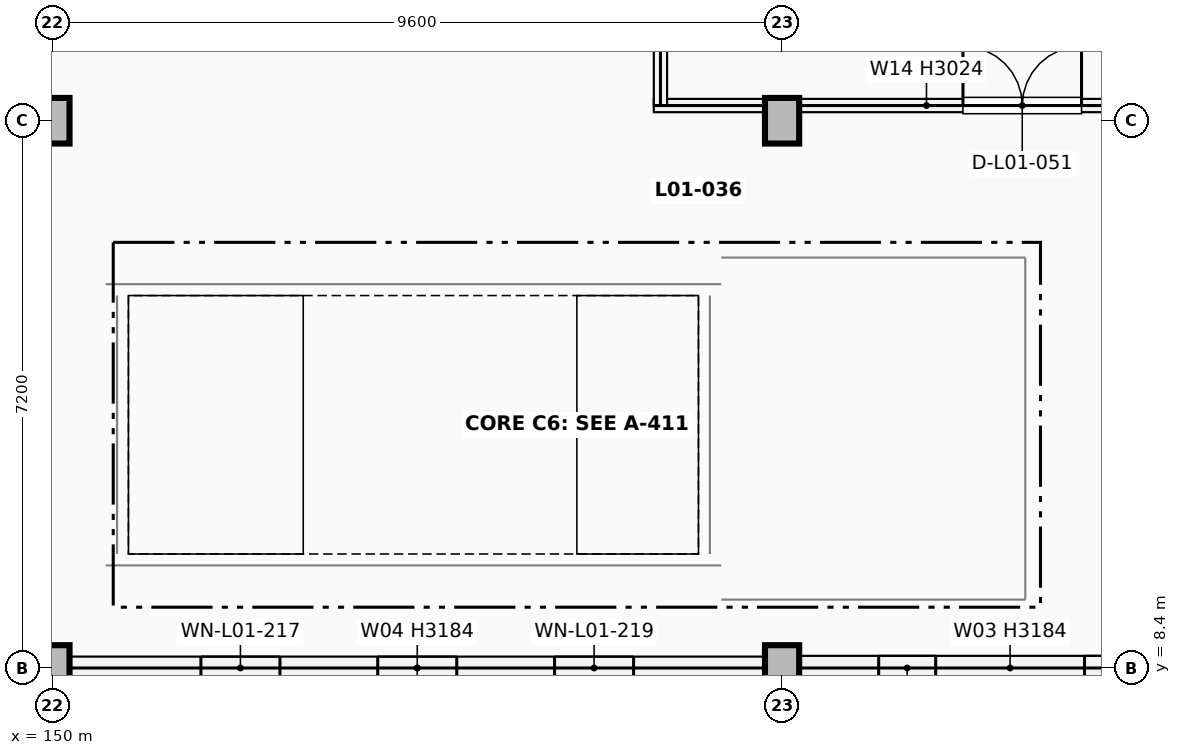
"""IFC4 building model, lengths in metres.
Left out: names, types, materials, properties, quantities, classifications, styles, units other than length and angle.
Written with IfcOpenShell. Run it as: python <this file> out.ifc"""

import sys

from ifc_helpers import new_model, si_unit, direction, frame, frame_2d, origin, origin_2d, place, context, subcontext, project, spatial, rectangle, extrude, element, fill, save


model = new_model("IFC4")
c1 = context("Model", 3, precision=1e-05, world=origin(), true_north=direction((0.0, 1.0)))
c2 = subcontext(c1, "Body", "Model", "MODEL_VIEW")
j1 = project(units=[si_unit("LENGTHUNIT", "METRE"), si_unit("PLANEANGLEUNIT", "RADIAN")], contexts=[c1])
p1 = place(None, origin())
s1 = spatial("IfcSite", under=j1, at=p1, CompositionType="ELEMENT")
p2 = place(p1, origin())
s2 = spatial("IfcBuilding", under=s1, at=p2, CompositionType="ELEMENT")
p3 = place(p2, frame((0.0, 0.0, 5.1)))
s3 = spatial("IfcBuildingStorey", under=s2, at=p3, CompositionType="ELEMENT", Elevation=5.1)
for number, where, z_axis, x_axis in (
    (1, (150.0, 8.4, 0.0), (0.0, 0.0, 1.0), (1.0, 0.0, 0.0)),
    (2, (150.0, 15.6, 0.0), (0.0, 0.0, 1.0), (1.0, 0.0, 0.0)),
    (3, (159.6, 8.4, 0.0), (0.0, 0.0, 1.0), (1.0, 0.0, 0.0)),
    (4, (159.6, 15.6, 0.0), (0.0, 0.0, 1.0), (1.0, 0.0, 0.0)),
):
    element("IfcColumn", number, at=place(p3, frame(where, z_axis=z_axis, x_axis=x_axis)), inside=s3, PredefinedType="COLUMN", context=c2, shape_type="SweptSolid", body=[
        extrude(rectangle(XDim=0.45, YDim=0.6, at=origin_2d()), origin(), (0.0, 0.0, 1.0), 4.42),
    ])
p4 = place(p3, frame((150.227, 8.4, 0.0), z_axis=(0.0, 0.0, 1.0), x_axis=(1.0, 0.0, 0.0)))
e5 = element("IfcWall", 5, at=p4, inside=s3, PredefinedType="SOLIDWALL", context=c2, shape_type="SweptSolid", body=[
    extrude(rectangle(XDim=9.146, YDim=0.3, at=frame_2d((4.573, 0.0))), origin(), (0.0, 0.0, 1.0), 3.184),
])
p5 = place(p4, frame((1.727, 0.0, 0.75)))
e6 = element("IfcOpeningElement", 6, at=p5, cuts=e5, PredefinedType="OPENING", context=c2, shape_type="SweptSolid", body=[
    extrude(rectangle(XDim=1.04, YDim=2.18, at=frame_2d((0.52, 1.09))), frame((0.0, 0.16, 0.0), z_axis=(0.0, -1.0, 0.0), x_axis=(1.0, 0.0, 0.0)), (0.0, 0.0, 1.0), 0.32),
])
p6 = place(p4, frame((4.053, 0.0, 0.75)))
e7 = element("IfcOpeningElement", 7, at=p6, cuts=e5, PredefinedType="OPENING", context=c2, shape_type="SweptSolid", body=[
    extrude(rectangle(XDim=1.04, YDim=2.18, at=frame_2d((0.52, 1.09))), frame((0.0, 0.16, 0.0), z_axis=(0.0, -1.0, 0.0), x_axis=(1.0, 0.0, 0.0)), (0.0, 0.0, 1.0), 0.32),
])
p7 = place(p4, frame((6.379, 0.0, 0.75)))
e8 = element("IfcOpeningElement", 8, at=p7, cuts=e5, PredefinedType="OPENING", context=c2, shape_type="SweptSolid", body=[
    extrude(rectangle(XDim=1.04, YDim=2.18, at=frame_2d((0.52, 1.09))), frame((0.0, 0.16, 0.0), z_axis=(0.0, -1.0, 0.0), x_axis=(1.0, 0.0, 0.0)), (0.0, 0.0, 1.0), 0.32),
])
p8 = place(p3, frame((159.827, 8.4, 0.0), z_axis=(0.0, 0.0, 1.0), x_axis=(1.0, 0.0, 0.0)))
e9 = element("IfcWall", 9, at=p8, inside=s3, PredefinedType="SOLIDWALL", context=c2, shape_type="SweptSolid", body=[
    extrude(rectangle(XDim=5.546, YDim=0.32, at=frame_2d((2.773, 0.0))), origin(), (0.0, 0.0, 1.0), 3.184),
])
p9 = place(p8, frame((1.044, 0.0, 0.75)))
e10 = element("IfcOpeningElement", 10, at=p9, cuts=e9, PredefinedType="OPENING", context=c2, shape_type="SweptSolid", body=[
    extrude(rectangle(XDim=0.75, YDim=2.3, at=frame_2d((0.375, 1.15))), frame((0.0, 0.17, 0.0), z_axis=(0.0, -1.0, 0.0), x_axis=(1.0, 0.0, 0.0)), (0.0, 0.0, 1.0), 0.34),
])
p10 = place(p8, frame((3.752, 0.0, 0.75)))
e11 = element("IfcOpeningElement", 11, at=p10, cuts=e9, PredefinedType="OPENING", context=c2, shape_type="SweptSolid", body=[
    extrude(rectangle(XDim=0.75, YDim=2.3, at=frame_2d((0.375, 1.15))), frame((0.0, 0.17, 0.0), z_axis=(0.0, -1.0, 0.0), x_axis=(1.0, 0.0, 0.0)), (0.0, 0.0, 1.0), 0.34),
])
p11 = place(p3, frame((150.85, 9.9, 0.0), z_axis=(0.0, 0.0, 1.0), x_axis=(0.0, 1.0, 0.0)))
e12 = element("IfcWall", 12, at=p11, inside=s3, PredefinedType="SHEAR", context=c2, shape_type="SweptSolid", body=[
    extrude(rectangle(XDim=3.4, YDim=0.3, at=frame_2d((1.7, 0.0))), origin(), (0.0, 0.0, 1.0), 4.42),
])
for number, where, z_axis, x_axis in (
    (13, (150.7, 9.75, 0.0), (0.0, 0.0, 1.0), (1.0, 0.0, 0.0)),
    (14, (150.7, 13.45, 0.0), (0.0, 0.0, 1.0), (1.0, 0.0, 0.0)),
):
    element("IfcWall", number, at=place(p3, frame(where, z_axis=z_axis, x_axis=x_axis)), inside=s3, PredefinedType="SHEAR", context=c2, shape_type="SweptSolid", body=[
        extrude(rectangle(XDim=8.1, YDim=0.3, at=frame_2d((4.05, 0.0))), origin(), (0.0, 0.0, 1.0), 4.42),
    ])
p12 = place(p3, frame((158.65, 9.9, 0.0), z_axis=(0.0, 0.0, 1.0), x_axis=(0.0, 1.0, 0.0)))
e15 = element("IfcWall", 15, at=p12, inside=s3, PredefinedType="SHEAR", context=c2, shape_type="SweptSolid", body=[
    extrude(rectangle(XDim=3.4, YDim=0.3, at=frame_2d((1.7, 0.0))), origin(), (0.0, 0.0, 1.0), 4.42),
])
p13 = place(p12, frame((1.1, 0.0, 0.0)))
e16 = element("IfcOpeningElement", 16, at=p13, cuts=e15, PredefinedType="OPENING", context=c2, shape_type="SweptSolid", body=[
    extrude(rectangle(XDim=1.2, YDim=2.2, at=frame_2d((0.6, 1.1))), frame((0.0, 0.16, 0.0), z_axis=(0.0, -1.0, 0.0), x_axis=(1.0, 0.0, 0.0)), (0.0, 0.0, 1.0), 0.32),
])
p14 = place(p3, frame((162.8, 9.3, 0.0), z_axis=(0.0, 0.0, 1.0), x_axis=(0.0, 1.0, 0.0)))
e17 = element("IfcWall", 17, at=p14, inside=s3, PredefinedType="PARTITIONING", context=c2, shape_type="SweptSolid", body=[
    extrude(rectangle(XDim=4.5, YDim=0.2, at=frame_2d((2.25, 0.0))), origin(), (0.0, 0.0, 1.0), 3.184),
])
p15 = place(p3, frame((158.8, 9.3, 0.0), z_axis=(0.0, 0.0, 1.0), x_axis=(1.0, 0.0, 0.0)))
e18 = element("IfcWall", 18, at=p15, inside=s3, PredefinedType="PARTITIONING", context=c2, shape_type="SweptSolid", body=[
    extrude(rectangle(XDim=4.0, YDim=0.2, at=frame_2d((2.0, 0.0))), origin(), (0.0, 0.0, 1.0), 3.184),
])
p16 = place(p3, frame((158.8, 13.8, 0.0), z_axis=(0.0, 0.0, 1.0), x_axis=(1.0, 0.0, 0.0)))
e19 = element("IfcWall", 19, at=p16, inside=s3, PredefinedType="PARTITIONING", context=c2, shape_type="SweptSolid", body=[
    extrude(rectangle(XDim=4.0, YDim=0.2, at=frame_2d((2.0, 0.0))), origin(), (0.0, 0.0, 1.0), 3.184),
])
p17 = place(p16, frame((1.275, 0.0, 0.0)))
e20 = element("IfcOpeningElement", 20, at=p17, cuts=e19, PredefinedType="OPENING", context=c2, shape_type="SweptSolid", body=[
    extrude(rectangle(XDim=1.45, YDim=2.2, at=frame_2d((0.725, 1.1))), frame((0.0, 0.11, 0.0), z_axis=(0.0, -1.0, 0.0), x_axis=(1.0, 0.0, 0.0)), (0.0, 0.0, 1.0), 0.22),
])
p18 = place(p3, frame((157.913, 15.8, 0.0), z_axis=(0.0, 0.0, 1.0), x_axis=(1.0, 0.0, 0.0)))
e21 = element("IfcWall", 21, at=p18, inside=s3, PredefinedType="PARTITIONING", context=c2, shape_type="SweptSolid", body=[
    extrude(rectangle(XDim=7.175, YDim=0.175, at=frame_2d((3.587, 0.0))), origin(), (0.0, 0.0, 1.0), 3.024),
])
p19 = place(p18, frame((4.067, 0.0, 0.0)))
e22 = element("IfcOpeningElement", 22, at=p19, cuts=e21, PredefinedType="OPENING", context=c2, shape_type="SweptSolid", body=[
    extrude(rectangle(XDim=1.56, YDim=2.3, at=frame_2d((0.78, 1.15))), frame((0.0, 0.098, 0.0), z_axis=(0.0, -1.0, 0.0), x_axis=(1.0, 0.0, 0.0)), (0.0, 0.0, 1.0), 0.195),
])
p20 = place(p3, frame((158.0, 15.8, 0.0), z_axis=(0.0, 0.0, 1.0), x_axis=(0.0, 1.0, 0.0)))
e23 = element("IfcWall", 23, at=p20, inside=s3, PredefinedType="PARTITIONING", context=c2, shape_type="SweptSolid", body=[
    extrude(rectangle(XDim=28.2, YDim=0.175, at=frame_2d((14.1, 0.0))), origin(), (0.0, 0.0, 1.0), 3.244),
])
p21 = place(p5, origin())
e24 = element("IfcWindow", 24, at=p21, inside=s3, PartitioningType="SINGLE_PANEL", PredefinedType="WINDOW", context=c2, shape_type="SweptSolid", body=[
    extrude(rectangle(XDim=1.04, YDim=2.18, at=frame_2d((0.52, 1.09))), frame((0.0, 0.03, 0.0), z_axis=(0.0, -1.0, 0.0), x_axis=(1.0, 0.0, 0.0)), (0.0, 0.0, 1.0), 0.06),
])
fill(e6, e24)
p22 = place(p6, origin())
e25 = element("IfcWindow", 25, at=p22, inside=s3, PartitioningType="SINGLE_PANEL", PredefinedType="WINDOW", context=c2, shape_type="SweptSolid", body=[
    extrude(rectangle(XDim=1.04, YDim=2.18, at=frame_2d((0.52, 1.09))), frame((0.0, 0.03, 0.0), z_axis=(0.0, -1.0, 0.0), x_axis=(1.0, 0.0, 0.0)), (0.0, 0.0, 1.0), 0.06),
])
fill(e7, e25)
p23 = place(p7, origin())
e26 = element("IfcWindow", 26, at=p23, inside=s3, PartitioningType="SINGLE_PANEL", PredefinedType="WINDOW", context=c2, shape_type="SweptSolid", body=[
    extrude(rectangle(XDim=1.04, YDim=2.18, at=frame_2d((0.52, 1.09))), frame((0.0, 0.03, 0.0), z_axis=(0.0, -1.0, 0.0), x_axis=(1.0, 0.0, 0.0)), (0.0, 0.0, 1.0), 0.06),
])
fill(e8, e26)
p24 = place(p9, origin())
e27 = element("IfcWindow", 27, at=p24, inside=s3, PartitioningType="SINGLE_PANEL", PredefinedType="WINDOW", context=c2, shape_type="SweptSolid", body=[
    extrude(rectangle(XDim=0.75, YDim=2.3, at=frame_2d((0.375, 1.15))), frame((0.0, 0.03, 0.0), z_axis=(0.0, -1.0, 0.0), x_axis=(1.0, 0.0, 0.0)), (0.0, 0.0, 1.0), 0.06),
])
fill(e10, e27)
p25 = place(p10, origin())
e28 = element("IfcWindow", 28, at=p25, inside=s3, PartitioningType="SINGLE_PANEL", PredefinedType="WINDOW", context=c2, shape_type="SweptSolid", body=[
    extrude(rectangle(XDim=0.75, YDim=2.3, at=frame_2d((0.375, 1.15))), frame((0.0, 0.03, 0.0), z_axis=(0.0, -1.0, 0.0), x_axis=(1.0, 0.0, 0.0)), (0.0, 0.0, 1.0), 0.06),
])
fill(e11, e28)
p26 = place(p13, origin())
e29 = element("IfcDoor", 29, at=p26, inside=s3, OperationType="SINGLE_SWING_RIGHT", PredefinedType="DOOR", context=c2, shape_type="SweptSolid", body=[
    extrude(rectangle(XDim=1.2, YDim=2.2, at=frame_2d((0.6, 1.1))), frame((0.0, 0.025, 0.0), z_axis=(0.0, -1.0, 0.0), x_axis=(1.0, 0.0, 0.0)), (0.0, 0.0, 1.0), 0.05),
])
fill(e16, e29)
p27 = place(p17, origin())
e30 = element("IfcDoor", 30, at=p27, inside=s3, OperationType="DOUBLE_DOOR_SINGLE_SWING", PredefinedType="DOOR", context=c2, shape_type="SweptSolid", body=[
    extrude(rectangle(XDim=1.45, YDim=2.2, at=frame_2d((0.725, 1.1))), frame((0.0, 0.025, 0.0), z_axis=(0.0, -1.0, 0.0), x_axis=(1.0, 0.0, 0.0)), (0.0, 0.0, 1.0), 0.05),
])
fill(e20, e30)
p28 = place(p19, origin())
e31 = element("IfcDoor", 31, at=p28, inside=s3, OperationType="DOUBLE_DOOR_SINGLE_SWING", PredefinedType="DOOR", context=c2, shape_type="SweptSolid", body=[
    extrude(rectangle(XDim=1.56, YDim=2.3, at=frame_2d((0.78, 1.15))), frame((0.0, 0.025, 0.0), z_axis=(0.0, -1.0, 0.0), x_axis=(1.0, 0.0, 0.0)), (0.0, 0.0, 1.0), 0.05),
])
fill(e22, e31)
save(model, sys.argv[1])
